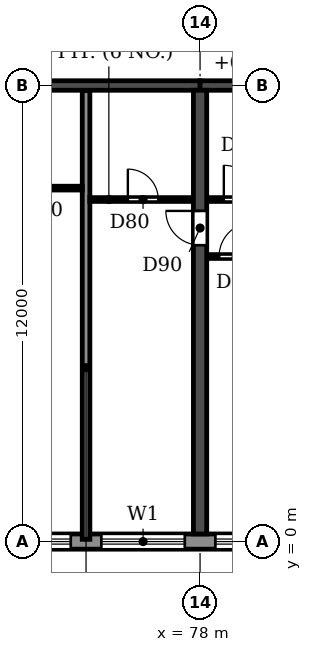
"""IFC4 building model, lengths in metres.
Left out: names, types, materials, properties, quantities, classifications, styles, units other than length and angle.
Written with IfcOpenShell. Run it as: python <this file> out.ifc"""

import sys

from ifc_helpers import new_model, si_unit, direction, frame, frame_2d, origin, place, context, subcontext, project, spatial, rectangle, extrude, element, fill, save


model = new_model("IFC4")
c1 = context("Model", 3, precision=1e-05, world=origin(), true_north=direction((0.0, 1.0)))
c2 = subcontext(c1, "Body", "Model", "MODEL_VIEW")
j1 = project(units=[si_unit("LENGTHUNIT", "METRE"), si_unit("PLANEANGLEUNIT", "RADIAN")], contexts=[c1])
p1 = place(None, origin())
s1 = spatial("IfcSite", under=j1, at=p1, CompositionType="ELEMENT")
p2 = place(p1, origin())
s2 = spatial("IfcBuilding", under=s1, at=p2, CompositionType="ELEMENT")
p3 = place(p2, frame((0.0, 0.0, 112.5)))
s3 = spatial("IfcBuildingStorey", under=s2, at=p3, CompositionType="ELEMENT", Elevation=112.5)
p4 = place(p3, frame((78.0, 0.2, 0.0), z_axis=(0.0, 0.0, 1.0), x_axis=(0.0, 1.0, 0.0)))
e1 = element("IfcWall", 1, at=p4, inside=s3, PredefinedType="SHEAR", context=c2, shape_type="SweptSolid", body=[
    extrude(rectangle(XDim=11.675, YDim=0.35, at=frame_2d((5.837, 0.0))), origin(), (0.0, 0.0, 1.0), 2.95),
])
p5 = place(p4, frame((7.6, 0.0, 0.0)))
e2 = element("IfcOpeningElement", 2, at=p5, cuts=e1, PredefinedType="OPENING", context=c2, shape_type="SweptSolid", body=[
    extrude(rectangle(XDim=0.9, YDim=2.1, at=frame_2d((0.45, 1.05))), frame((0.0, 0.185, 0.0), z_axis=(0.0, -1.0, 0.0), x_axis=(1.0, 0.0, 0.0)), (0.0, 0.0, 1.0), 0.37),
])
p6 = place(p3, frame((72.0, 12.0, 0.0), z_axis=(0.0, 0.0, 1.0), x_axis=(1.0, 0.0, 0.0)))
e3 = element("IfcWall", 3, at=p6, inside=s3, PredefinedType="SHEAR", context=c2, shape_type="SweptSolid", body=[
    extrude(rectangle(XDim=6.0, YDim=0.25, at=frame_2d((3.0, 0.0))), origin(), (0.0, 0.0, 1.0), 2.35),
])
p7 = place(p3, frame((78.0, 12.0, 0.0), z_axis=(0.0, 0.0, 1.0), x_axis=(1.0, 0.0, 0.0)))
e4 = element("IfcWall", 4, at=p7, inside=s3, PredefinedType="SHEAR", context=c2, shape_type="SweptSolid", body=[
    extrude(rectangle(XDim=6.0, YDim=0.25, at=frame_2d((3.0, 0.0))), origin(), (0.0, 0.0, 1.0), 2.35),
])
p8 = place(p7, frame((2.55, 0.0, 0.0)))
e5 = element("IfcOpeningElement", 5, at=p8, cuts=e4, PredefinedType="OPENING", context=c2, shape_type="SweptSolid", body=[
    extrude(rectangle(XDim=1.0, YDim=2.1, at=frame_2d((0.5, 1.05))), frame((0.0, 0.135, 0.0), z_axis=(0.0, -1.0, 0.0), x_axis=(1.0, 0.0, 0.0)), (0.0, 0.0, 1.0), 0.27),
])
p9 = place(p3, frame((16.683, 0.0, 0.0), z_axis=(0.0, 0.0, 1.0), x_axis=(1.0, 0.0, 0.0)))
e6 = element("IfcWall", 6, at=p9, inside=s3, PredefinedType="STANDARD", context=c2, shape_type="SweptSolid", body=[
    extrude(rectangle(XDim=68.634, YDim=0.4, at=frame_2d((34.317, 0.0))), origin(), (0.0, 0.0, 1.0), 2.95),
])
p10 = place(p9, frame((1.717, 0.0, 0.9)))
e7 = element("IfcOpeningElement", 7, at=p10, cuts=e6, PredefinedType="OPENING", context=c2, shape_type="SweptSolid", body=[
    extrude(rectangle(XDim=2.2, YDim=1.5, at=frame_2d((1.1, 0.75))), frame((0.0, 0.21, 0.0), z_axis=(0.0, -1.0, 0.0), x_axis=(1.0, 0.0, 0.0)), (0.0, 0.0, 1.0), 0.42),
])
p11 = place(p9, frame((4.717, 0.0, 0.9)))
e8 = element("IfcOpeningElement", 8, at=p11, cuts=e6, PredefinedType="OPENING", context=c2, shape_type="SweptSolid", body=[
    extrude(rectangle(XDim=2.2, YDim=1.5, at=frame_2d((1.1, 0.75))), frame((0.0, 0.21, 0.0), z_axis=(0.0, -1.0, 0.0), x_axis=(1.0, 0.0, 0.0)), (0.0, 0.0, 1.0), 0.42),
])
p12 = place(p9, frame((7.717, 0.0, 0.9)))
e9 = element("IfcOpeningElement", 9, at=p12, cuts=e6, PredefinedType="OPENING", context=c2, shape_type="SweptSolid", body=[
    extrude(rectangle(XDim=2.2, YDim=1.5, at=frame_2d((1.1, 0.75))), frame((0.0, 0.21, 0.0), z_axis=(0.0, -1.0, 0.0), x_axis=(1.0, 0.0, 0.0)), (0.0, 0.0, 1.0), 0.42),
])
p13 = place(p9, frame((10.917, 0.0, 0.0)))
e10 = element("IfcOpeningElement", 10, at=p13, cuts=e6, PredefinedType="OPENING", context=c2, shape_type="SweptSolid", body=[
    extrude(rectangle(XDim=1.8, YDim=2.4, at=frame_2d((0.9, 1.2))), frame((0.0, 0.21, 0.0), z_axis=(0.0, -1.0, 0.0), x_axis=(1.0, 0.0, 0.0)), (0.0, 0.0, 1.0), 0.42),
])
p14 = place(p9, frame((13.717, 0.0, 0.9)))
e11 = element("IfcOpeningElement", 11, at=p14, cuts=e6, PredefinedType="OPENING", context=c2, shape_type="SweptSolid", body=[
    extrude(rectangle(XDim=2.2, YDim=1.5, at=frame_2d((1.1, 0.75))), frame((0.0, 0.21, 0.0), z_axis=(0.0, -1.0, 0.0), x_axis=(1.0, 0.0, 0.0)), (0.0, 0.0, 1.0), 0.42),
])
p15 = place(p9, frame((16.717, 0.0, 0.9)))
e12 = element("IfcOpeningElement", 12, at=p15, cuts=e6, PredefinedType="OPENING", context=c2, shape_type="SweptSolid", body=[
    extrude(rectangle(XDim=2.2, YDim=1.5, at=frame_2d((1.1, 0.75))), frame((0.0, 0.21, 0.0), z_axis=(0.0, -1.0, 0.0), x_axis=(1.0, 0.0, 0.0)), (0.0, 0.0, 1.0), 0.42),
])
p16 = place(p9, frame((19.717, 0.0, 0.9)))
e13 = element("IfcOpeningElement", 13, at=p16, cuts=e6, PredefinedType="OPENING", context=c2, shape_type="SweptSolid", body=[
    extrude(rectangle(XDim=2.2, YDim=1.5, at=frame_2d((1.1, 0.75))), frame((0.0, 0.21, 0.0), z_axis=(0.0, -1.0, 0.0), x_axis=(1.0, 0.0, 0.0)), (0.0, 0.0, 1.0), 0.42),
])
p17 = place(p9, frame((22.717, 0.0, 0.9)))
e14 = element("IfcOpeningElement", 14, at=p17, cuts=e6, PredefinedType="OPENING", context=c2, shape_type="SweptSolid", body=[
    extrude(rectangle(XDim=2.2, YDim=1.5, at=frame_2d((1.1, 0.75))), frame((0.0, 0.21, 0.0), z_axis=(0.0, -1.0, 0.0), x_axis=(1.0, 0.0, 0.0)), (0.0, 0.0, 1.0), 0.42),
])
p18 = place(p9, frame((25.717, 0.0, 0.9)))
e15 = element("IfcOpeningElement", 15, at=p18, cuts=e6, PredefinedType="OPENING", context=c2, shape_type="SweptSolid", body=[
    extrude(rectangle(XDim=2.2, YDim=1.5, at=frame_2d((1.1, 0.75))), frame((0.0, 0.21, 0.0), z_axis=(0.0, -1.0, 0.0), x_axis=(1.0, 0.0, 0.0)), (0.0, 0.0, 1.0), 0.42),
])
p19 = place(p9, frame((28.717, 0.0, 0.9)))
e16 = element("IfcOpeningElement", 16, at=p19, cuts=e6, PredefinedType="OPENING", context=c2, shape_type="SweptSolid", body=[
    extrude(rectangle(XDim=2.2, YDim=1.5, at=frame_2d((1.1, 0.75))), frame((0.0, 0.21, 0.0), z_axis=(0.0, -1.0, 0.0), x_axis=(1.0, 0.0, 0.0)), (0.0, 0.0, 1.0), 0.42),
])
p20 = place(p9, frame((31.917, 0.0, 0.0)))
e17 = element("IfcOpeningElement", 17, at=p20, cuts=e6, PredefinedType="OPENING", context=c2, shape_type="SweptSolid", body=[
    extrude(rectangle(XDim=1.8, YDim=2.4, at=frame_2d((0.9, 1.2))), frame((0.0, 0.21, 0.0), z_axis=(0.0, -1.0, 0.0), x_axis=(1.0, 0.0, 0.0)), (0.0, 0.0, 1.0), 0.42),
])
p21 = place(p9, frame((34.717, 0.0, 0.9)))
e18 = element("IfcOpeningElement", 18, at=p21, cuts=e6, PredefinedType="OPENING", context=c2, shape_type="SweptSolid", body=[
    extrude(rectangle(XDim=2.2, YDim=1.5, at=frame_2d((1.1, 0.75))), frame((0.0, 0.21, 0.0), z_axis=(0.0, -1.0, 0.0), x_axis=(1.0, 0.0, 0.0)), (0.0, 0.0, 1.0), 0.42),
])
p22 = place(p9, frame((37.717, 0.0, 0.9)))
e19 = element("IfcOpeningElement", 19, at=p22, cuts=e6, PredefinedType="OPENING", context=c2, shape_type="SweptSolid", body=[
    extrude(rectangle(XDim=2.2, YDim=1.5, at=frame_2d((1.1, 0.75))), frame((0.0, 0.21, 0.0), z_axis=(0.0, -1.0, 0.0), x_axis=(1.0, 0.0, 0.0)), (0.0, 0.0, 1.0), 0.42),
])
p23 = place(p9, frame((40.717, 0.0, 0.9)))
e20 = element("IfcOpeningElement", 20, at=p23, cuts=e6, PredefinedType="OPENING", context=c2, shape_type="SweptSolid", body=[
    extrude(rectangle(XDim=2.2, YDim=1.5, at=frame_2d((1.1, 0.75))), frame((0.0, 0.21, 0.0), z_axis=(0.0, -1.0, 0.0), x_axis=(1.0, 0.0, 0.0)), (0.0, 0.0, 1.0), 0.42),
])
p24 = place(p9, frame((43.717, 0.0, 0.9)))
e21 = element("IfcOpeningElement", 21, at=p24, cuts=e6, PredefinedType="OPENING", context=c2, shape_type="SweptSolid", body=[
    extrude(rectangle(XDim=2.2, YDim=1.5, at=frame_2d((1.1, 0.75))), frame((0.0, 0.21, 0.0), z_axis=(0.0, -1.0, 0.0), x_axis=(1.0, 0.0, 0.0)), (0.0, 0.0, 1.0), 0.42),
])
p25 = place(p9, frame((46.917, 0.0, 0.0)))
e22 = element("IfcOpeningElement", 22, at=p25, cuts=e6, PredefinedType="OPENING", context=c2, shape_type="SweptSolid", body=[
    extrude(rectangle(XDim=1.8, YDim=2.4, at=frame_2d((0.9, 1.2))), frame((0.0, 0.21, 0.0), z_axis=(0.0, -1.0, 0.0), x_axis=(1.0, 0.0, 0.0)), (0.0, 0.0, 1.0), 0.42),
])
p26 = place(p9, frame((49.717, 0.0, 0.9)))
e23 = element("IfcOpeningElement", 23, at=p26, cuts=e6, PredefinedType="OPENING", context=c2, shape_type="SweptSolid", body=[
    extrude(rectangle(XDim=2.2, YDim=1.5, at=frame_2d((1.1, 0.75))), frame((0.0, 0.21, 0.0), z_axis=(0.0, -1.0, 0.0), x_axis=(1.0, 0.0, 0.0)), (0.0, 0.0, 1.0), 0.42),
])
p27 = place(p9, frame((52.717, 0.0, 0.9)))
e24 = element("IfcOpeningElement", 24, at=p27, cuts=e6, PredefinedType="OPENING", context=c2, shape_type="SweptSolid", body=[
    extrude(rectangle(XDim=2.2, YDim=1.5, at=frame_2d((1.1, 0.75))), frame((0.0, 0.21, 0.0), z_axis=(0.0, -1.0, 0.0), x_axis=(1.0, 0.0, 0.0)), (0.0, 0.0, 1.0), 0.42),
])
p28 = place(p9, frame((55.717, 0.0, 0.9)))
e25 = element("IfcOpeningElement", 25, at=p28, cuts=e6, PredefinedType="OPENING", context=c2, shape_type="SweptSolid", body=[
    extrude(rectangle(XDim=2.2, YDim=1.5, at=frame_2d((1.1, 0.75))), frame((0.0, 0.21, 0.0), z_axis=(0.0, -1.0, 0.0), x_axis=(1.0, 0.0, 0.0)), (0.0, 0.0, 1.0), 0.42),
])
p29 = place(p9, frame((58.717, 0.0, 0.9)))
e26 = element("IfcOpeningElement", 26, at=p29, cuts=e6, PredefinedType="OPENING", context=c2, shape_type="SweptSolid", body=[
    extrude(rectangle(XDim=2.2, YDim=1.5, at=frame_2d((1.1, 0.75))), frame((0.0, 0.21, 0.0), z_axis=(0.0, -1.0, 0.0), x_axis=(1.0, 0.0, 0.0)), (0.0, 0.0, 1.0), 0.42),
])
p30 = place(p9, frame((61.717, 0.0, 0.9)))
e27 = element("IfcOpeningElement", 27, at=p30, cuts=e6, PredefinedType="OPENING", context=c2, shape_type="SweptSolid", body=[
    extrude(rectangle(XDim=2.2, YDim=1.5, at=frame_2d((1.1, 0.75))), frame((0.0, 0.21, 0.0), z_axis=(0.0, -1.0, 0.0), x_axis=(1.0, 0.0, 0.0)), (0.0, 0.0, 1.0), 0.42),
])
p31 = place(p9, frame((64.717, 0.0, 0.9)))
e28 = element("IfcOpeningElement", 28, at=p31, cuts=e6, PredefinedType="OPENING", context=c2, shape_type="SweptSolid", body=[
    extrude(rectangle(XDim=2.2, YDim=1.5, at=frame_2d((1.1, 0.75))), frame((0.0, 0.21, 0.0), z_axis=(0.0, -1.0, 0.0), x_axis=(1.0, 0.0, 0.0)), (0.0, 0.0, 1.0), 0.42),
])
p32 = place(p3, frame((75.0, 0.06, 0.0), z_axis=(0.0, 0.0, 1.0), x_axis=(0.0, 1.0, 0.0)))
e29 = element("IfcWall", 29, at=p32, inside=s3, PredefinedType="PARTITIONING", context=c2, shape_type="SweptSolid", body=[
    extrude(rectangle(XDim=11.805, YDim=0.2, at=frame_2d((5.902, 0.0))), origin(), (0.0, 0.0, 1.0), 2.95),
])
p33 = place(p3, frame((78.185, 7.5, 0.0), z_axis=(0.0, 0.0, 1.0), x_axis=(1.0, 0.0, 0.0)))
e30 = element("IfcWall", 30, at=p33, inside=s3, PredefinedType="PARTITIONING", context=c2, shape_type="SweptSolid", body=[
    extrude(rectangle(XDim=2.865, YDim=0.1, at=frame_2d((1.433, 0.0))), origin(), (0.0, 0.0, 1.0), 2.95),
])
p34 = place(p33, frame((0.315, 0.0, 0.0)))
e31 = element("IfcOpeningElement", 31, at=p34, cuts=e30, PredefinedType="OPENING", context=c2, shape_type="SweptSolid", body=[
    extrude(rectangle(XDim=0.9, YDim=2.1, at=frame_2d((0.45, 1.05))), frame((0.0, 0.06, 0.0), z_axis=(0.0, -1.0, 0.0), x_axis=(1.0, 0.0, 0.0)), (0.0, 0.0, 1.0), 0.12),
])
p35 = place(p3, frame((75.1, 9.0, 0.0), z_axis=(0.0, 0.0, 1.0), x_axis=(1.0, 0.0, 0.0)))
e32 = element("IfcWall", 32, at=p35, inside=s3, PredefinedType="PARTITIONING", context=c2, shape_type="SweptSolid", body=[
    extrude(rectangle(XDim=2.715, YDim=0.1, at=frame_2d((1.357, 0.0))), origin(), (0.0, 0.0, 1.0), 2.95),
])
p36 = place(p35, frame((1.0, 0.0, 0.0)))
e33 = element("IfcOpeningElement", 33, at=p36, cuts=e32, PredefinedType="OPENING", context=c2, shape_type="SweptSolid", body=[
    extrude(rectangle(XDim=0.8, YDim=2.1, at=frame_2d((0.4, 1.05))), frame((0.0, 0.06, 0.0), z_axis=(0.0, -1.0, 0.0), x_axis=(1.0, 0.0, 0.0)), (0.0, 0.0, 1.0), 0.12),
])
p37 = place(p3, frame((78.185, 9.0, 0.0), z_axis=(0.0, 0.0, 1.0), x_axis=(1.0, 0.0, 0.0)))
e34 = element("IfcWall", 34, at=p37, inside=s3, PredefinedType="PARTITIONING", context=c2, shape_type="SweptSolid", body=[
    extrude(rectangle(XDim=2.015, YDim=0.1, at=frame_2d((1.007, 0.0))), origin(), (0.0, 0.0, 1.0), 2.95),
])
p38 = place(p37, frame((0.44, 0.0, 0.0)))
e35 = element("IfcOpeningElement", 35, at=p38, cuts=e34, PredefinedType="OPENING", context=c2, shape_type="SweptSolid", body=[
    extrude(rectangle(XDim=0.9, YDim=2.1, at=frame_2d((0.45, 1.05))), frame((0.0, 0.06, 0.0), z_axis=(0.0, -1.0, 0.0), x_axis=(1.0, 0.0, 0.0)), (0.0, 0.0, 1.0), 0.12),
])
p39 = place(p3, frame((72.185, 9.3, 0.0), z_axis=(0.0, 0.0, 1.0), x_axis=(1.0, 0.0, 0.0)))
e36 = element("IfcWall", 36, at=p39, inside=s3, PredefinedType="PARTITIONING", context=c2, shape_type="SweptSolid", body=[
    extrude(rectangle(XDim=2.715, YDim=0.1, at=frame_2d((1.357, 0.0))), origin(), (0.0, 0.0, 1.0), 2.95),
])
p40 = place(p39, frame((0.915, 0.0, 0.0)))
e37 = element("IfcOpeningElement", 37, at=p40, cuts=e36, PredefinedType="OPENING", context=c2, shape_type="SweptSolid", body=[
    extrude(rectangle(XDim=0.8, YDim=2.1, at=frame_2d((0.4, 1.05))), frame((0.0, 0.06, 0.0), z_axis=(0.0, -1.0, 0.0), x_axis=(1.0, 0.0, 0.0)), (0.0, 0.0, 1.0), 0.12),
])
p41 = place(p28, origin())
e38 = element("IfcWindow", 38, at=p41, inside=s3, PartitioningType="DOUBLE_PANEL_HORIZONTAL", PredefinedType="WINDOW", context=c2, shape_type="SweptSolid", body=[
    extrude(rectangle(XDim=2.2, YDim=1.5, at=frame_2d((1.1, 0.75))), frame((0.0, 0.03, 0.0), z_axis=(0.0, -1.0, 0.0), x_axis=(1.0, 0.0, 0.0)), (0.0, 0.0, 1.0), 0.06),
])
fill(e25, e38)
p42 = place(p29, origin())
e39 = element("IfcWindow", 39, at=p42, inside=s3, PartitioningType="DOUBLE_PANEL_HORIZONTAL", PredefinedType="WINDOW", context=c2, shape_type="SweptSolid", body=[
    extrude(rectangle(XDim=2.2, YDim=1.5, at=frame_2d((1.1, 0.75))), frame((0.0, 0.03, 0.0), z_axis=(0.0, -1.0, 0.0), x_axis=(1.0, 0.0, 0.0)), (0.0, 0.0, 1.0), 0.06),
])
fill(e26, e39)
p43 = place(p30, origin())
e40 = element("IfcWindow", 40, at=p43, inside=s3, PartitioningType="DOUBLE_PANEL_HORIZONTAL", PredefinedType="WINDOW", context=c2, shape_type="SweptSolid", body=[
    extrude(rectangle(XDim=2.2, YDim=1.5, at=frame_2d((1.1, 0.75))), frame((0.0, 0.03, 0.0), z_axis=(0.0, -1.0, 0.0), x_axis=(1.0, 0.0, 0.0)), (0.0, 0.0, 1.0), 0.06),
])
fill(e27, e40)
p44 = place(p36, origin())
e41 = element("IfcDoor", 41, at=p44, inside=s3, OperationType="SINGLE_SWING_LEFT", PredefinedType="DOOR", context=c2, shape_type="SweptSolid", body=[
    extrude(rectangle(XDim=0.8, YDim=2.1, at=frame_2d((0.4, 1.05))), frame((0.0, 0.025, 0.0), z_axis=(0.0, -1.0, 0.0), x_axis=(1.0, 0.0, 0.0)), (0.0, 0.0, 1.0), 0.05),
])
fill(e33, e41)
p45 = place(p5, origin())
e42 = element("IfcDoor", 42, at=p45, inside=s3, OperationType="SINGLE_SWING_RIGHT", PredefinedType="DOOR", context=c2, shape_type="SweptSolid", body=[
    extrude(rectangle(XDim=0.9, YDim=2.1, at=frame_2d((0.45, 1.05))), frame((0.0, 0.025, 0.0), z_axis=(0.0, -1.0, 0.0), x_axis=(1.0, 0.0, 0.0)), (0.0, 0.0, 1.0), 0.05),
])
fill(e2, e42)
p46 = place(p34, origin())
e43 = element("IfcDoor", 43, at=p46, inside=s3, OperationType="SINGLE_SWING_RIGHT", PredefinedType="DOOR", context=c2, shape_type="SweptSolid", body=[
    extrude(rectangle(XDim=0.9, YDim=2.1, at=frame_2d((0.45, 1.05))), frame((0.0, 0.025, 0.0), z_axis=(0.0, -1.0, 0.0), x_axis=(1.0, 0.0, 0.0)), (0.0, 0.0, 1.0), 0.05),
])
fill(e31, e43)
p47 = place(p38, origin())
e44 = element("IfcDoor", 44, at=p47, inside=s3, OperationType="SINGLE_SWING_LEFT", PredefinedType="DOOR", context=c2, shape_type="SweptSolid", body=[
    extrude(rectangle(XDim=0.9, YDim=2.1, at=frame_2d((0.45, 1.05))), frame((0.0, 0.025, 0.0), z_axis=(0.0, -1.0, 0.0), x_axis=(1.0, 0.0, 0.0)), (0.0, 0.0, 1.0), 0.05),
])
fill(e35, e44)
save(model, sys.argv[1])
